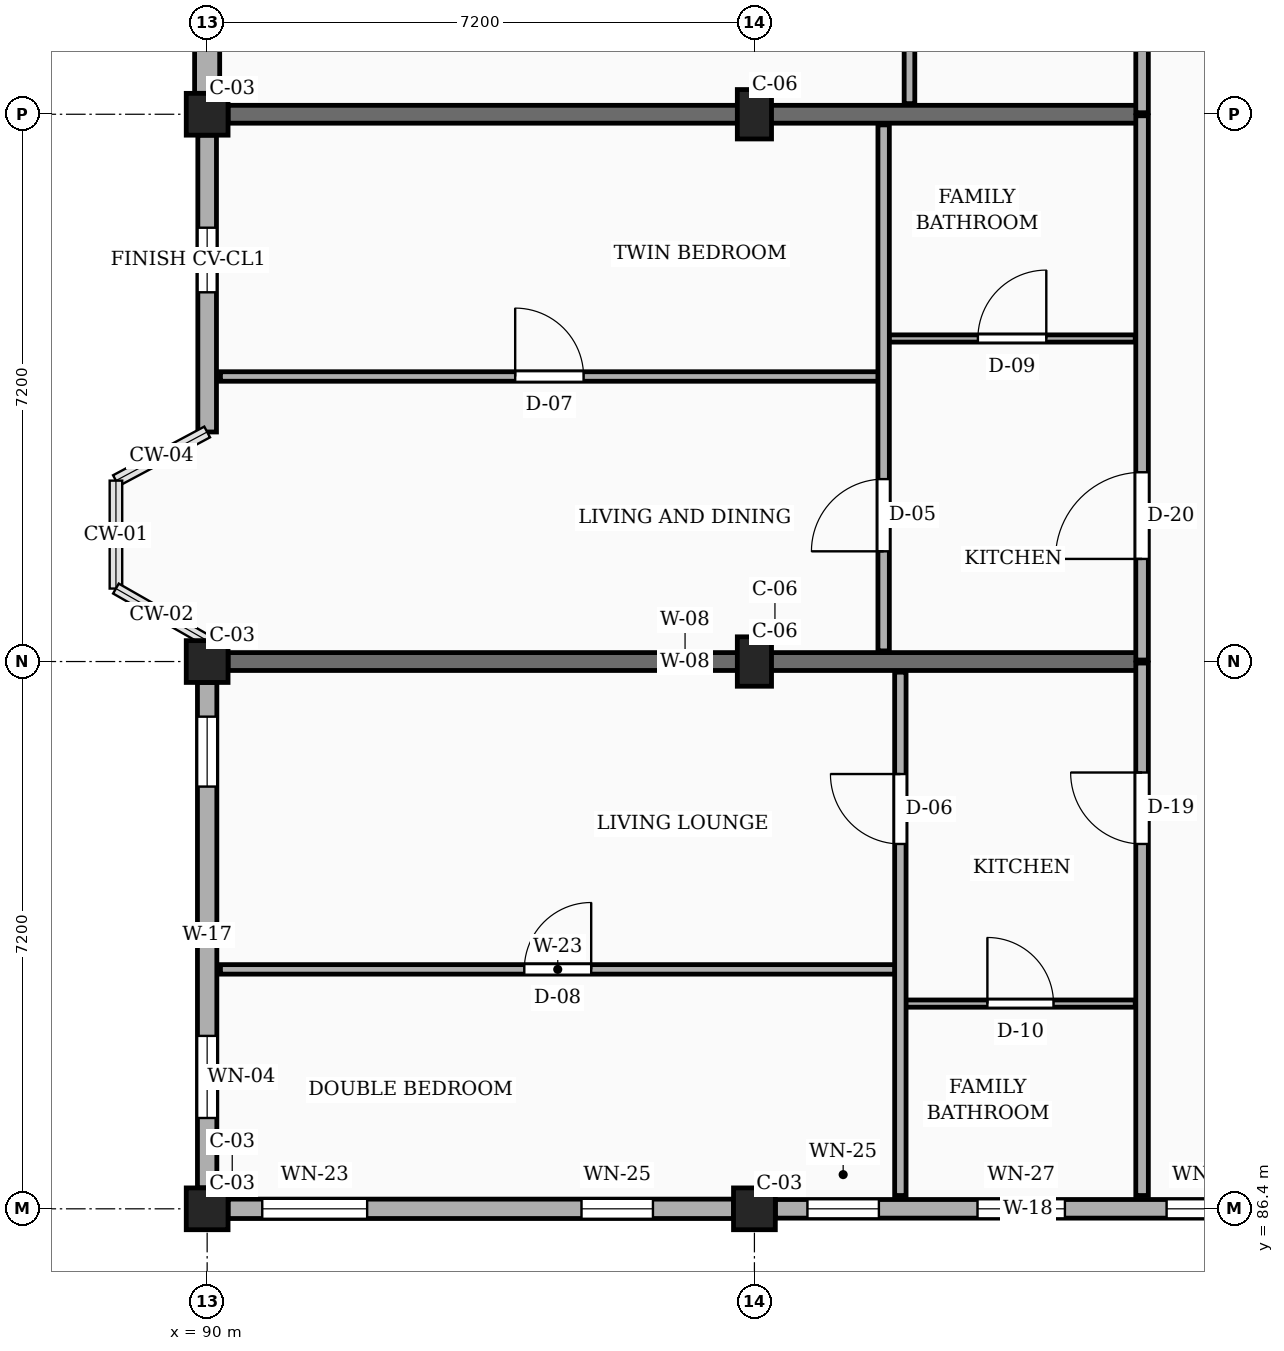
"""IFC4 building model, lengths in metres.
Left out: names, types, materials, properties, quantities, classifications, styles, units other than length and angle.
Written with IfcOpenShell. Run it as: python <this file> out.ifc"""

import sys

from ifc_helpers import new_model, si_unit, direction, frame, frame_2d, origin, origin_2d, place, context, subcontext, project, spatial, rectangle, extrude, element, fill, save


model = new_model("IFC4")
c1 = context("Model", 3, precision=1e-05, world=origin(), true_north=direction((0.0, 1.0)))
c2 = subcontext(c1, "Body", "Model", "MODEL_VIEW")
j1 = project(units=[si_unit("LENGTHUNIT", "METRE"), si_unit("PLANEANGLEUNIT", "RADIAN")], contexts=[c1])
p1 = place(None, origin())
s1 = spatial("IfcSite", under=j1, at=p1, CompositionType="ELEMENT")
p2 = place(p1, origin())
s2 = spatial("IfcBuilding", under=s1, at=p2, CompositionType="ELEMENT")
p3 = place(p2, frame((0.0, 0.0, 17.1)))
s3 = spatial("IfcBuildingStorey", under=s2, at=p3, CompositionType="ELEMENT", Elevation=17.1)
for number, where, z_axis, x_axis in (
    (1, (90.0, 86.4, 0.0), (0.0, 0.0, 1.0), (1.0, 0.0, 0.0)),
    (2, (90.0, 93.6, 0.0), (0.0, 0.0, 1.0), (1.0, 0.0, 0.0)),
    (3, (90.0, 100.8, 0.0), (0.0, 0.0, 1.0), (1.0, 0.0, 0.0)),
    (4, (97.2, 86.4, 0.0), (0.0, 0.0, 1.0), (1.0, 0.0, 0.0)),
):
    element("IfcColumn", number, at=place(p3, frame(where, z_axis=z_axis, x_axis=x_axis)), inside=s3, PredefinedType="COLUMN", context=c2, shape_type="SweptSolid", body=[
        extrude(rectangle(XDim=0.55, YDim=0.55, at=origin_2d()), origin(), (0.0, 0.0, 1.0), 3.15),
    ])
for number, where, z_axis, x_axis in (
    (5, (97.2, 93.6, 0.0), (0.0, 0.0, 1.0), (1.0, 0.0, 0.0)),
    (6, (97.2, 100.8, 0.0), (0.0, 0.0, 1.0), (1.0, 0.0, 0.0)),
):
    element("IfcColumn", number, at=place(p3, frame(where, z_axis=z_axis, x_axis=x_axis)), inside=s3, PredefinedType="COLUMN", context=c2, shape_type="SweptSolid", body=[
        extrude(rectangle(XDim=0.45, YDim=0.65, at=origin_2d()), origin(), (0.0, 0.0, 1.0), 3.15),
    ])
for number, where, z_axis, x_axis in (
    (7, (90.275, 93.6, 0.0), (0.0, 0.0, 1.0), (1.0, 0.0, 0.0)),
    (8, (90.275, 100.8, 0.0), (0.0, 0.0, 1.0), (1.0, 0.0, 0.0)),
):
    element("IfcWall", number, at=place(p3, frame(where, z_axis=z_axis, x_axis=x_axis)), inside=s3, PredefinedType="SOLIDWALL", context=c2, shape_type="SweptSolid", body=[
        extrude(rectangle(XDim=12.025, YDim=0.235, at=frame_2d((6.013, 0.0))), origin(), (0.0, 0.0, 1.0), 2.19),
    ])
p4 = place(p3, frame((90.275, 86.4, 0.0), z_axis=(0.0, 0.0, 1.0), x_axis=(1.0, 0.0, 0.0)))
e9 = element("IfcWall", 9, at=p4, inside=s3, PredefinedType="SOLIDWALL", context=c2, shape_type="SweptSolid", body=[
    extrude(rectangle(XDim=6.65, YDim=0.255, at=frame_2d((3.325, 0.0))), origin(), (0.0, 0.0, 1.0), 2.46),
])
p5 = place(p4, frame((0.45, 0.0, 0.78)))
e10 = element("IfcOpeningElement", 10, at=p5, cuts=e9, PredefinedType="OPENING", context=c2, shape_type="SweptSolid", body=[
    extrude(rectangle(XDim=1.38, YDim=1.36, at=frame_2d((0.69, 0.68))), frame((0.0, 0.137, 0.0), z_axis=(0.0, -1.0, 0.0), x_axis=(1.0, 0.0, 0.0)), (0.0, 0.0, 1.0), 0.275),
])
p6 = place(p4, frame((4.65, 0.0, 0.78)))
e11 = element("IfcOpeningElement", 11, at=p6, cuts=e9, PredefinedType="OPENING", context=c2, shape_type="SweptSolid", body=[
    extrude(rectangle(XDim=0.94, YDim=1.44, at=frame_2d((0.47, 0.72))), frame((0.0, 0.137, 0.0), z_axis=(0.0, -1.0, 0.0), x_axis=(1.0, 0.0, 0.0)), (0.0, 0.0, 1.0), 0.275),
])
p7 = place(p3, frame((97.475, 86.4, 0.0), z_axis=(0.0, 0.0, 1.0), x_axis=(1.0, 0.0, 0.0)))
e12 = element("IfcWall", 12, at=p7, inside=s3, PredefinedType="SOLIDWALL", context=c2, shape_type="SweptSolid", body=[
    extrude(rectangle(XDim=6.65, YDim=0.245, at=frame_2d((3.325, 0.0))), origin(), (0.0, 0.0, 1.0), 2.46),
])
p8 = place(p7, frame((0.423, 0.0, 0.78)))
e13 = element("IfcOpeningElement", 13, at=p8, cuts=e12, PredefinedType="OPENING", context=c2, shape_type="SweptSolid", body=[
    extrude(rectangle(XDim=0.94, YDim=1.44, at=frame_2d((0.47, 0.72))), frame((0.0, 0.133, 0.0), z_axis=(0.0, -1.0, 0.0), x_axis=(1.0, 0.0, 0.0)), (0.0, 0.0, 1.0), 0.265),
])
p9 = place(p7, frame((2.66, 0.0, 0.78)))
e14 = element("IfcOpeningElement", 14, at=p9, cuts=e12, PredefinedType="OPENING", context=c2, shape_type="SweptSolid", body=[
    extrude(rectangle(XDim=1.15, YDim=1.44, at=frame_2d((0.575, 0.72))), frame((0.0, 0.133, 0.0), z_axis=(0.0, -1.0, 0.0), x_axis=(1.0, 0.0, 0.0)), (0.0, 0.0, 1.0), 0.265),
])
p10 = place(p7, frame((5.147, 0.0, 0.78)))
e15 = element("IfcOpeningElement", 15, at=p10, cuts=e12, PredefinedType="OPENING", context=c2, shape_type="SweptSolid", body=[
    extrude(rectangle(XDim=1.04, YDim=1.26, at=frame_2d((0.52, 0.63))), frame((0.0, 0.133, 0.0), z_axis=(0.0, -1.0, 0.0), x_axis=(1.0, 0.0, 0.0)), (0.0, 0.0, 1.0), 0.265),
])
p11 = place(p3, frame((90.0, 107.725, 0.0), z_axis=(0.0, 0.0, 1.0), x_axis=(0.0, -1.0, 0.0)))
e16 = element("IfcWall", 16, at=p11, inside=s3, PredefinedType="SOLIDWALL", context=c2, shape_type="SweptSolid", body=[
    extrude(rectangle(XDim=6.65, YDim=0.33, at=frame_2d((3.325, 0.0))), origin(), (0.0, 0.0, 1.0), 2.46),
])
p12 = place(p11, frame((0.45, 0.0, 0.78)))
e17 = element("IfcOpeningElement", 17, at=p12, cuts=e16, PredefinedType="OPENING", context=c2, shape_type="SweptSolid", body=[
    extrude(rectangle(XDim=1.35, YDim=1.44, at=frame_2d((0.675, 0.72))), frame((0.0, 0.175, 0.0), z_axis=(0.0, -1.0, 0.0), x_axis=(1.0, 0.0, 0.0)), (0.0, 0.0, 1.0), 0.35),
])
p13 = place(p11, frame((4.65, 0.0, 0.78)))
e18 = element("IfcOpeningElement", 18, at=p13, cuts=e16, PredefinedType="OPENING", context=c2, shape_type="SweptSolid", body=[
    extrude(rectangle(XDim=0.85, YDim=1.15, at=frame_2d((0.425, 0.575))), frame((0.0, 0.175, 0.0), z_axis=(0.0, -1.0, 0.0), x_axis=(1.0, 0.0, 0.0)), (0.0, 0.0, 1.0), 0.35),
])
p14 = place(p3, frame((90.0, 100.525, 0.0), z_axis=(0.0, 0.0, 1.0), x_axis=(0.0, -1.0, 0.0)))
e19 = element("IfcWall", 19, at=p14, inside=s3, PredefinedType="SOLIDWALL", context=c2, shape_type="SweptSolid", body=[
    extrude(rectangle(XDim=3.905, YDim=0.245, at=frame_2d((1.952, 0.0))), origin(), (0.0, 0.0, 1.0), 2.46),
])
p15 = place(p14, frame((1.218, 0.0, 0.78)))
e20 = element("IfcOpeningElement", 20, at=p15, cuts=e19, PredefinedType="OPENING", context=c2, shape_type="SweptSolid", body=[
    extrude(rectangle(XDim=0.85, YDim=1.15, at=frame_2d((0.425, 0.575))), frame((0.0, 0.133, 0.0), z_axis=(0.0, -1.0, 0.0), x_axis=(1.0, 0.0, 0.0)), (0.0, 0.0, 1.0), 0.265),
])
p16 = place(p3, frame((90.0, 93.325, 0.0), z_axis=(0.0, 0.0, 1.0), x_axis=(0.0, -1.0, 0.0)))
e21 = element("IfcWall", 21, at=p16, inside=s3, PredefinedType="SOLIDWALL", context=c2, shape_type="SweptSolid", body=[
    extrude(rectangle(XDim=6.65, YDim=0.255, at=frame_2d((3.325, 0.0))), origin(), (0.0, 0.0, 1.0), 2.46),
])
p17 = place(p16, frame((0.45, 0.0, 0.78)))
e22 = element("IfcOpeningElement", 22, at=p17, cuts=e21, PredefinedType="OPENING", context=c2, shape_type="SweptSolid", body=[
    extrude(rectangle(XDim=0.92, YDim=1.15, at=frame_2d((0.46, 0.575))), frame((0.0, 0.137, 0.0), z_axis=(0.0, -1.0, 0.0), x_axis=(1.0, 0.0, 0.0)), (0.0, 0.0, 1.0), 0.275),
])
p18 = place(p16, frame((4.65, 0.0, 0.78)))
e23 = element("IfcOpeningElement", 23, at=p18, cuts=e21, PredefinedType="OPENING", context=c2, shape_type="SweptSolid", body=[
    extrude(rectangle(XDim=1.08, YDim=1.15, at=frame_2d((0.54, 0.575))), frame((0.0, 0.137, 0.0), z_axis=(0.0, -1.0, 0.0), x_axis=(1.0, 0.0, 0.0)), (0.0, 0.0, 1.0), 0.275),
])
p19 = place(p3, frame((102.3, 86.575, 0.0), z_axis=(0.0, 0.0, 1.0), x_axis=(0.0, 1.0, 0.0)))
e24 = element("IfcWall", 24, at=p19, inside=s3, PredefinedType="PARTITIONING", context=c2, shape_type="SweptSolid", body=[
    extrude(rectangle(XDim=7.005, YDim=0.165, at=frame_2d((3.502, 0.0))), origin(), (0.0, 0.0, 1.0), 2.325),
])
p20 = place(p19, frame((4.625, 0.0, 0.0)))
e25 = element("IfcOpeningElement", 25, at=p20, cuts=e24, PredefinedType="OPENING", context=c2, shape_type="SweptSolid", body=[
    extrude(rectangle(XDim=0.94, YDim=2.12, at=frame_2d((0.47, 1.06))), frame((0.0, 0.093, 0.0), z_axis=(0.0, -1.0, 0.0), x_axis=(1.0, 0.0, 0.0)), (0.0, 0.0, 1.0), 0.185),
])
p21 = place(p3, frame((102.3, 93.62, 0.0), z_axis=(0.0, 0.0, 1.0), x_axis=(0.0, 1.0, 0.0)))
e26 = element("IfcWall", 26, at=p21, inside=s3, PredefinedType="PARTITIONING", context=c2, shape_type="SweptSolid", body=[
    extrude(rectangle(XDim=7.16, YDim=0.165, at=frame_2d((3.58, 0.0))), origin(), (0.0, 0.0, 1.0), 2.325),
])
p22 = place(p21, frame((1.33, 0.0, 0.0)))
e27 = element("IfcOpeningElement", 27, at=p22, cuts=e26, PredefinedType="OPENING", context=c2, shape_type="SweptSolid", body=[
    extrude(rectangle(XDim=1.14, YDim=2.18, at=frame_2d((0.57, 1.09))), frame((0.0, 0.093, 0.0), z_axis=(0.0, -1.0, 0.0), x_axis=(1.0, 0.0, 0.0)), (0.0, 0.0, 1.0), 0.185),
])
p23 = place(p3, frame((102.3, 100.82, 0.0), z_axis=(0.0, 0.0, 1.0), x_axis=(0.0, 1.0, 0.0)))
e28 = element("IfcWall", 28, at=p23, inside=s3, PredefinedType="PARTITIONING", context=c2, shape_type="SweptSolid", body=[
    extrude(rectangle(XDim=7.16, YDim=0.165, at=frame_2d((3.58, 0.0))), origin(), (0.0, 0.0, 1.0), 2.325),
])
p24 = place(p23, frame((1.33, 0.0, 0.0)))
e29 = element("IfcOpeningElement", 29, at=p24, cuts=e28, PredefinedType="OPENING", context=c2, shape_type="SweptSolid", body=[
    extrude(rectangle(XDim=1.0, YDim=2.15, at=frame_2d((0.5, 1.075))), frame((0.0, 0.093, 0.0), z_axis=(0.0, -1.0, 0.0), x_axis=(1.0, 0.0, 0.0)), (0.0, 0.0, 1.0), 0.185),
])
p25 = place(p3, frame((90.175, 89.55, 0.0), z_axis=(0.0, 0.0, 1.0), x_axis=(1.0, 0.0, 0.0)))
e30 = element("IfcWall", 30, at=p25, inside=s3, PredefinedType="PARTITIONING", context=c2, shape_type="SweptSolid", body=[
    extrude(rectangle(XDim=8.875, YDim=0.125, at=frame_2d((4.438, 0.0))), origin(), (0.0, 0.0, 1.0), 2.325),
])
p26 = place(p25, frame((3.998, 0.0, 0.0)))
e31 = element("IfcOpeningElement", 31, at=p26, cuts=e30, PredefinedType="OPENING", context=c2, shape_type="SweptSolid", body=[
    extrude(rectangle(XDim=0.88, YDim=2.08, at=frame_2d((0.44, 1.04))), frame((0.0, 0.073, 0.0), z_axis=(0.0, -1.0, 0.0), x_axis=(1.0, 0.0, 0.0)), (0.0, 0.0, 1.0), 0.145),
])
p27 = place(p3, frame((99.19, 89.1, 0.0), z_axis=(0.0, 0.0, 1.0), x_axis=(1.0, 0.0, 0.0)))
e32 = element("IfcWall", 32, at=p27, inside=s3, PredefinedType="PARTITIONING", context=c2, shape_type="SweptSolid", body=[
    extrude(rectangle(XDim=3.02, YDim=0.095, at=frame_2d((1.51, 0.0))), origin(), (0.0, 0.0, 1.0), 2.325),
])
p28 = place(p27, frame((1.075, 0.0, 0.0)))
e33 = element("IfcOpeningElement", 33, at=p28, cuts=e32, PredefinedType="OPENING", context=c2, shape_type="SweptSolid", body=[
    extrude(rectangle(XDim=0.87, YDim=2.05, at=frame_2d((0.435, 1.025))), frame((0.0, 0.058, 0.0), z_axis=(0.0, -1.0, 0.0), x_axis=(1.0, 0.0, 0.0)), (0.0, 0.0, 1.0), 0.115),
])
p29 = place(p3, frame((99.12, 86.575, 0.0), z_axis=(0.0, 0.0, 1.0), x_axis=(0.0, 1.0, 0.0)))
e34 = element("IfcWall", 34, at=p29, inside=s3, PredefinedType="PARTITIONING", context=c2, shape_type="SweptSolid", body=[
    extrude(rectangle(XDim=6.885, YDim=0.15, at=frame_2d((3.442, 0.0))), origin(), (0.0, 0.0, 1.0), 2.325),
])
p30 = place(p29, frame((4.625, 0.0, 0.0)))
e35 = element("IfcOpeningElement", 35, at=p30, cuts=e34, PredefinedType="OPENING", context=c2, shape_type="SweptSolid", body=[
    extrude(rectangle(XDim=0.92, YDim=2.1, at=frame_2d((0.46, 1.05))), frame((0.0, 0.085, 0.0), z_axis=(0.0, -1.0, 0.0), x_axis=(1.0, 0.0, 0.0)), (0.0, 0.0, 1.0), 0.17),
])
p31 = place(p3, frame((90.175, 97.35, 0.0), z_axis=(0.0, 0.0, 1.0), x_axis=(1.0, 0.0, 0.0)))
e36 = element("IfcWall", 36, at=p31, inside=s3, PredefinedType="PARTITIONING", context=c2, shape_type="SweptSolid", body=[
    extrude(rectangle(XDim=8.655, YDim=0.125, at=frame_2d((4.328, 0.0))), origin(), (0.0, 0.0, 1.0), 2.325),
])
p32 = place(p31, frame((3.877, 0.0, 0.0)))
e37 = element("IfcOpeningElement", 37, at=p32, cuts=e36, PredefinedType="OPENING", context=c2, shape_type="SweptSolid", body=[
    extrude(rectangle(XDim=0.9, YDim=2.1, at=frame_2d((0.45, 1.05))), frame((0.0, 0.073, 0.0), z_axis=(0.0, -1.0, 0.0), x_axis=(1.0, 0.0, 0.0)), (0.0, 0.0, 1.0), 0.145),
])
p33 = place(p3, frame((98.97, 97.85, 0.0), z_axis=(0.0, 0.0, 1.0), x_axis=(1.0, 0.0, 0.0)))
e38 = element("IfcWall", 38, at=p33, inside=s3, PredefinedType="PARTITIONING", context=c2, shape_type="SweptSolid", body=[
    extrude(rectangle(XDim=3.24, YDim=0.095, at=frame_2d((1.62, 0.0))), origin(), (0.0, 0.0, 1.0), 2.325),
])
p34 = place(p33, frame((1.17, 0.0, 0.0)))
e39 = element("IfcOpeningElement", 39, at=p34, cuts=e38, PredefinedType="OPENING", context=c2, shape_type="SweptSolid", body=[
    extrude(rectangle(XDim=0.9, YDim=2.05, at=frame_2d((0.45, 1.025))), frame((0.0, 0.058, 0.0), z_axis=(0.0, -1.0, 0.0), x_axis=(1.0, 0.0, 0.0)), (0.0, 0.0, 1.0), 0.115),
])
p35 = place(p3, frame((98.9, 93.74, 0.0), z_axis=(0.0, 0.0, 1.0), x_axis=(0.0, 1.0, 0.0)))
e40 = element("IfcWall", 40, at=p35, inside=s3, PredefinedType="PARTITIONING", context=c2, shape_type="SweptSolid", body=[
    extrude(rectangle(XDim=6.92, YDim=0.15, at=frame_2d((3.46, 0.0))), origin(), (0.0, 0.0, 1.0), 2.325),
])
p36 = place(p35, frame((1.31, 0.0, 0.0)))
e41 = element("IfcOpeningElement", 41, at=p36, cuts=e40, PredefinedType="OPENING", context=c2, shape_type="SweptSolid", body=[
    extrude(rectangle(XDim=0.95, YDim=2.1, at=frame_2d((0.475, 1.05))), frame((0.0, 0.085, 0.0), z_axis=(0.0, -1.0, 0.0), x_axis=(1.0, 0.0, 0.0)), (0.0, 0.0, 1.0), 0.17),
])
p37 = place(p3, frame((99.24, 100.94, 0.0), z_axis=(0.0, 0.0, 1.0), x_axis=(0.0, 1.0, 0.0)))
e42 = element("IfcWall", 42, at=p37, inside=s3, PredefinedType="PARTITIONING", context=c2, shape_type="SweptSolid", body=[
    extrude(rectangle(XDim=6.92, YDim=0.14, at=frame_2d((3.46, 0.0))), origin(), (0.0, 0.0, 1.0), 2.325),
])
p38 = place(p37, frame((1.31, 0.0, 0.0)))
e43 = element("IfcOpeningElement", 43, at=p38, cuts=e42, PredefinedType="OPENING", context=c2, shape_type="SweptSolid", body=[
    extrude(rectangle(XDim=0.92, YDim=2.1, at=frame_2d((0.46, 1.05))), frame((0.0, 0.08, 0.0), z_axis=(0.0, -1.0, 0.0), x_axis=(1.0, 0.0, 0.0)), (0.0, 0.0, 1.0), 0.16),
])
p39 = place(p5, origin())
e44 = element("IfcWindow", 44, at=p39, inside=s3, PartitioningType="SINGLE_PANEL", PredefinedType="WINDOW", context=c2, shape_type="SweptSolid", body=[
    extrude(rectangle(XDim=1.38, YDim=1.36, at=frame_2d((0.69, 0.68))), frame((0.0, 0.03, 0.0), z_axis=(0.0, -1.0, 0.0), x_axis=(1.0, 0.0, 0.0)), (0.0, 0.0, 1.0), 0.06),
])
fill(e10, e44)
p40 = place(p6, origin())
e45 = element("IfcWindow", 45, at=p40, inside=s3, PartitioningType="SINGLE_PANEL", PredefinedType="WINDOW", context=c2, shape_type="SweptSolid", body=[
    extrude(rectangle(XDim=0.94, YDim=1.44, at=frame_2d((0.47, 0.72))), frame((0.0, 0.03, 0.0), z_axis=(0.0, -1.0, 0.0), x_axis=(1.0, 0.0, 0.0)), (0.0, 0.0, 1.0), 0.06),
])
fill(e11, e45)
p41 = place(p8, origin())
e46 = element("IfcWindow", 46, at=p41, inside=s3, PartitioningType="SINGLE_PANEL", PredefinedType="WINDOW", context=c2, shape_type="SweptSolid", body=[
    extrude(rectangle(XDim=0.94, YDim=1.44, at=frame_2d((0.47, 0.72))), frame((0.0, 0.03, 0.0), z_axis=(0.0, -1.0, 0.0), x_axis=(1.0, 0.0, 0.0)), (0.0, 0.0, 1.0), 0.06),
])
fill(e13, e46)
p42 = place(p9, origin())
e47 = element("IfcWindow", 47, at=p42, inside=s3, PartitioningType="SINGLE_PANEL", PredefinedType="WINDOW", context=c2, shape_type="SweptSolid", body=[
    extrude(rectangle(XDim=1.15, YDim=1.44, at=frame_2d((0.575, 0.72))), frame((0.0, 0.03, 0.0), z_axis=(0.0, -1.0, 0.0), x_axis=(1.0, 0.0, 0.0)), (0.0, 0.0, 1.0), 0.06),
])
fill(e14, e47)
p43 = place(p10, origin())
e48 = element("IfcWindow", 48, at=p43, inside=s3, PartitioningType="SINGLE_PANEL", PredefinedType="WINDOW", context=c2, shape_type="SweptSolid", body=[
    extrude(rectangle(XDim=1.04, YDim=1.26, at=frame_2d((0.52, 0.63))), frame((0.0, 0.03, 0.0), z_axis=(0.0, -1.0, 0.0), x_axis=(1.0, 0.0, 0.0)), (0.0, 0.0, 1.0), 0.06),
])
fill(e15, e48)
p44 = place(p15, origin())
e49 = element("IfcWindow", 49, at=p44, inside=s3, PartitioningType="SINGLE_PANEL", PredefinedType="WINDOW", context=c2, shape_type="SweptSolid", body=[
    extrude(rectangle(XDim=0.85, YDim=1.15, at=frame_2d((0.425, 0.575))), frame((0.0, 0.03, 0.0), z_axis=(0.0, -1.0, 0.0), x_axis=(1.0, 0.0, 0.0)), (0.0, 0.0, 1.0), 0.06),
])
fill(e20, e49)
p45 = place(p17, origin())
e50 = element("IfcWindow", 50, at=p45, inside=s3, PartitioningType="SINGLE_PANEL", PredefinedType="WINDOW", context=c2, shape_type="SweptSolid", body=[
    extrude(rectangle(XDim=0.92, YDim=1.15, at=frame_2d((0.46, 0.575))), frame((0.0, 0.03, 0.0), z_axis=(0.0, -1.0, 0.0), x_axis=(1.0, 0.0, 0.0)), (0.0, 0.0, 1.0), 0.06),
])
fill(e22, e50)
p46 = place(p18, origin())
e51 = element("IfcWindow", 51, at=p46, inside=s3, PartitioningType="SINGLE_PANEL", PredefinedType="WINDOW", context=c2, shape_type="SweptSolid", body=[
    extrude(rectangle(XDim=1.08, YDim=1.15, at=frame_2d((0.54, 0.575))), frame((0.0, 0.03, 0.0), z_axis=(0.0, -1.0, 0.0), x_axis=(1.0, 0.0, 0.0)), (0.0, 0.0, 1.0), 0.06),
])
fill(e23, e51)
p47 = place(p20, origin())
e52 = element("IfcDoor", 52, at=p47, inside=s3, OperationType="SINGLE_SWING_RIGHT", PredefinedType="DOOR", context=c2, shape_type="SweptSolid", body=[
    extrude(rectangle(XDim=0.94, YDim=2.12, at=frame_2d((0.47, 1.06))), frame((0.0, 0.025, 0.0), z_axis=(0.0, -1.0, 0.0), x_axis=(1.0, 0.0, 0.0)), (0.0, 0.0, 1.0), 0.05),
])
fill(e25, e52)
p48 = place(p22, origin())
e53 = element("IfcDoor", 53, at=p48, inside=s3, OperationType="SINGLE_SWING_LEFT", PredefinedType="DOOR", context=c2, shape_type="SweptSolid", body=[
    extrude(rectangle(XDim=1.14, YDim=2.18, at=frame_2d((0.57, 1.09))), frame((0.0, 0.025, 0.0), z_axis=(0.0, -1.0, 0.0), x_axis=(1.0, 0.0, 0.0)), (0.0, 0.0, 1.0), 0.05),
])
fill(e27, e53)
p49 = place(p26, origin())
e54 = element("IfcDoor", 54, at=p49, inside=s3, OperationType="SINGLE_SWING_RIGHT", PredefinedType="DOOR", context=c2, shape_type="SweptSolid", body=[
    extrude(rectangle(XDim=0.88, YDim=2.08, at=frame_2d((0.44, 1.04))), frame((0.0, 0.025, 0.0), z_axis=(0.0, -1.0, 0.0), x_axis=(1.0, 0.0, 0.0)), (0.0, 0.0, 1.0), 0.05),
])
fill(e31, e54)
p50 = place(p28, origin())
e55 = element("IfcDoor", 55, at=p50, inside=s3, OperationType="SINGLE_SWING_LEFT", PredefinedType="DOOR", context=c2, shape_type="SweptSolid", body=[
    extrude(rectangle(XDim=0.87, YDim=2.05, at=frame_2d((0.435, 1.025))), frame((0.0, 0.025, 0.0), z_axis=(0.0, -1.0, 0.0), x_axis=(1.0, 0.0, 0.0)), (0.0, 0.0, 1.0), 0.05),
])
fill(e33, e55)
p51 = place(p30, origin())
e56 = element("IfcDoor", 56, at=p51, inside=s3, OperationType="SINGLE_SWING_RIGHT", PredefinedType="DOOR", context=c2, shape_type="SweptSolid", body=[
    extrude(rectangle(XDim=0.92, YDim=2.1, at=frame_2d((0.46, 1.05))), frame((0.0, 0.025, 0.0), z_axis=(0.0, -1.0, 0.0), x_axis=(1.0, 0.0, 0.0)), (0.0, 0.0, 1.0), 0.05),
])
fill(e35, e56)
p52 = place(p32, origin())
e57 = element("IfcDoor", 57, at=p52, inside=s3, OperationType="SINGLE_SWING_LEFT", PredefinedType="DOOR", context=c2, shape_type="SweptSolid", body=[
    extrude(rectangle(XDim=0.9, YDim=2.1, at=frame_2d((0.45, 1.05))), frame((0.0, 0.025, 0.0), z_axis=(0.0, -1.0, 0.0), x_axis=(1.0, 0.0, 0.0)), (0.0, 0.0, 1.0), 0.05),
])
fill(e37, e57)
p53 = place(p34, origin())
e58 = element("IfcDoor", 58, at=p53, inside=s3, OperationType="SINGLE_SWING_RIGHT", PredefinedType="DOOR", context=c2, shape_type="SweptSolid", body=[
    extrude(rectangle(XDim=0.9, YDim=2.05, at=frame_2d((0.45, 1.025))), frame((0.0, 0.025, 0.0), z_axis=(0.0, -1.0, 0.0), x_axis=(1.0, 0.0, 0.0)), (0.0, 0.0, 1.0), 0.05),
])
fill(e39, e58)
p54 = place(p36, origin())
e59 = element("IfcDoor", 59, at=p54, inside=s3, OperationType="SINGLE_SWING_LEFT", PredefinedType="DOOR", context=c2, shape_type="SweptSolid", body=[
    extrude(rectangle(XDim=0.95, YDim=2.1, at=frame_2d((0.475, 1.05))), frame((0.0, 0.025, 0.0), z_axis=(0.0, -1.0, 0.0), x_axis=(1.0, 0.0, 0.0)), (0.0, 0.0, 1.0), 0.05),
])
fill(e41, e59)
save(model, sys.argv[1])
